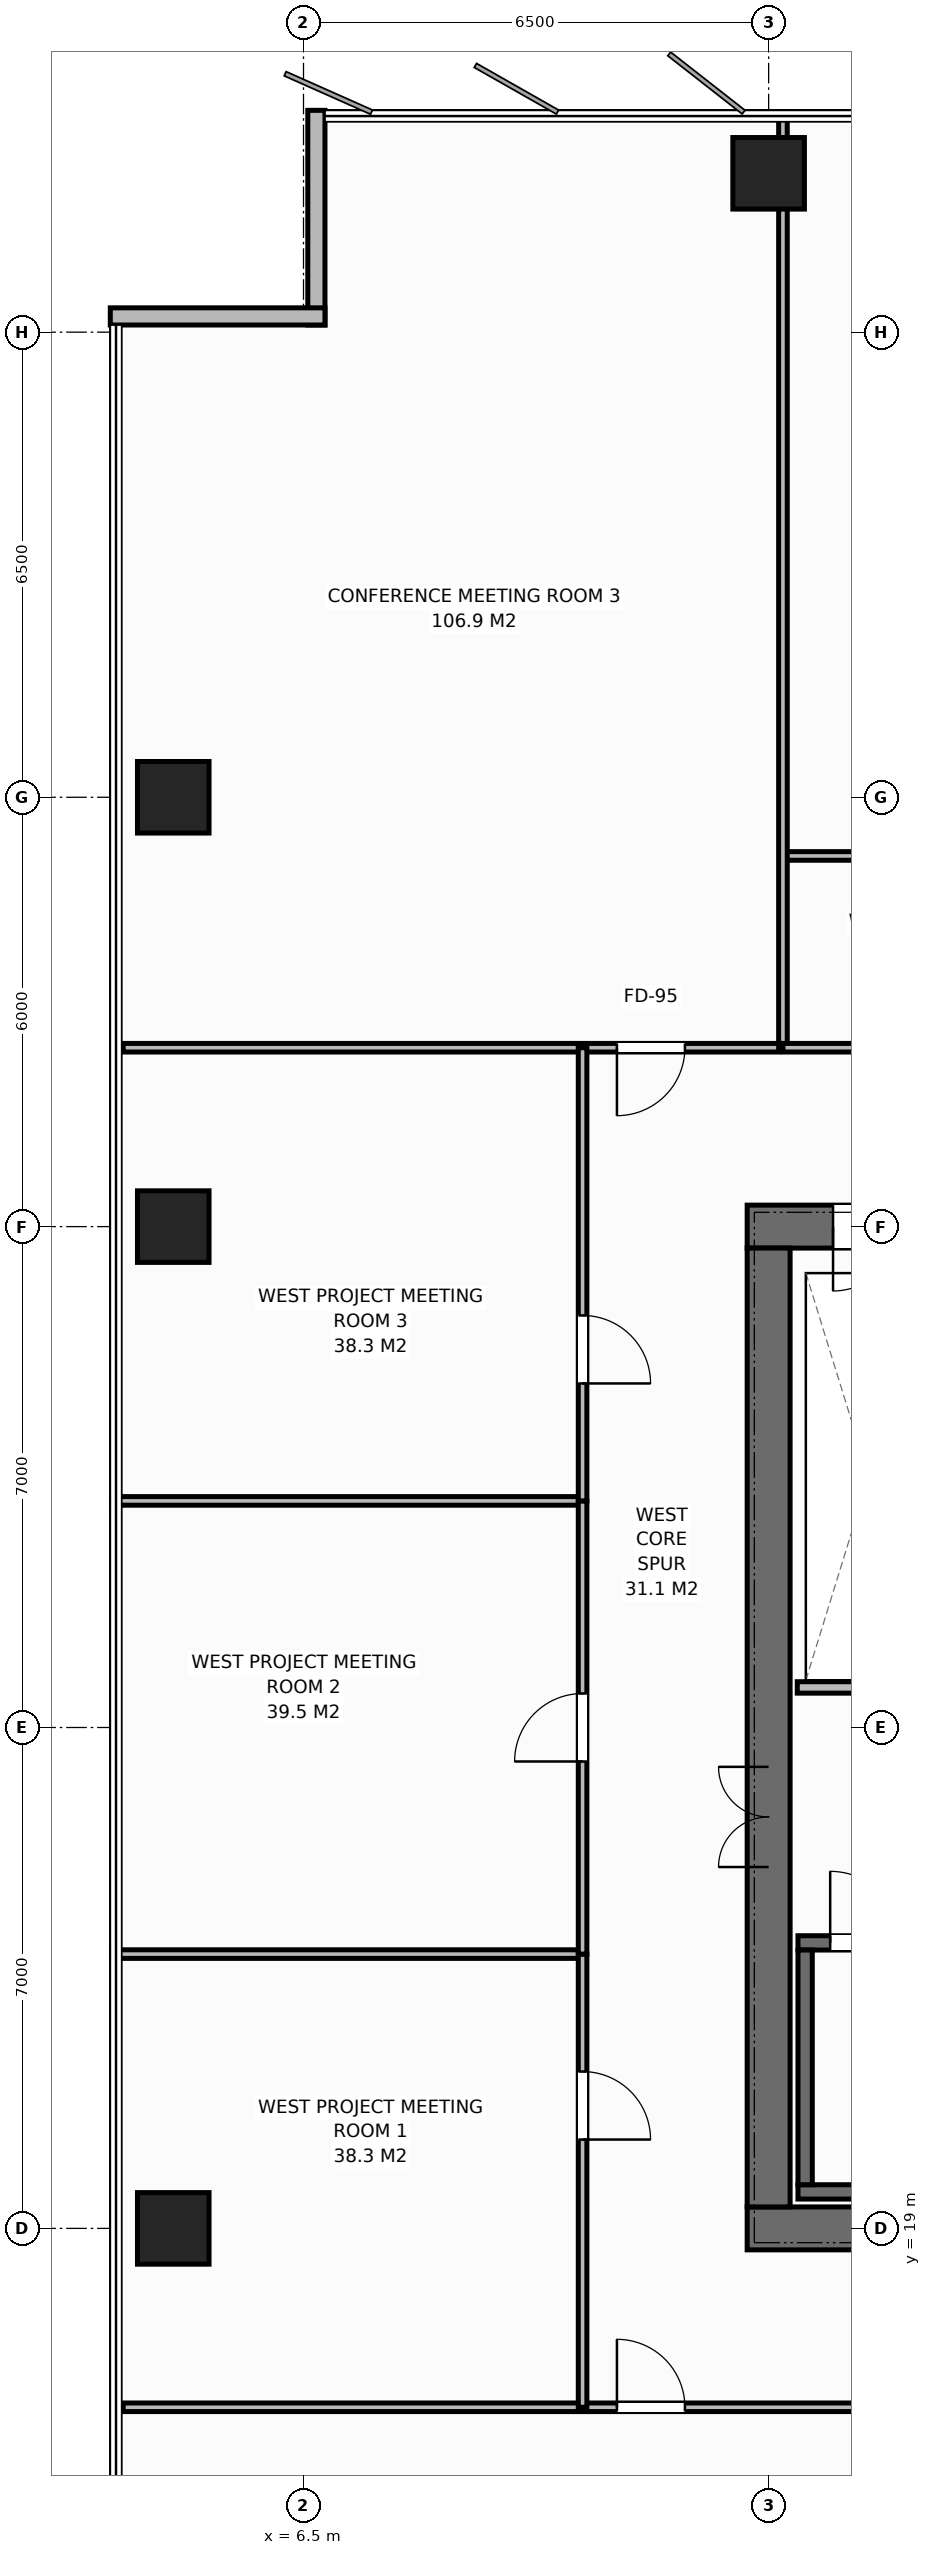
"""IFC4 building model, lengths in metres.
Left out: names, types, materials, properties, quantities, classifications, styles, units other than length and angle.
Written with IfcOpenShell. Run it as: python <this file> out.ifc"""

import sys

from ifc_helpers import new_model, si_unit, direction, frame, frame_2d, origin, origin_2d, place, context, subcontext, project, spatial, rectangle, extrude, element, fill, save


model = new_model("IFC4")
c1 = context("Model", 3, precision=1e-05, world=origin(), true_north=direction((0.0, 1.0)))
c2 = subcontext(c1, "Body", "Model", "MODEL_VIEW")
j1 = project(units=[si_unit("LENGTHUNIT", "METRE"), si_unit("PLANEANGLEUNIT", "RADIAN")], contexts=[c1])
p1 = place(None, origin())
s1 = spatial("IfcSite", under=j1, at=p1, CompositionType="ELEMENT")
p2 = place(p1, origin())
s2 = spatial("IfcBuilding", under=s1, at=p2, CompositionType="ELEMENT")
p3 = place(p2, frame((0.0, 0.0, 186.0)))
s3 = spatial("IfcBuildingStorey", under=s2, at=p3, CompositionType="ELEMENT", Elevation=186.0)
p4 = place(p3, frame((12.7, 19.0, 0.0), z_axis=(0.0, 0.0, 1.0), x_axis=(1.0, 0.0, 0.0)))
e1 = element("IfcWall", 1, at=p4, inside=s3, PredefinedType="SHEAR", context=c2, shape_type="SweptSolid", body=[
    extrude(rectangle(XDim=13.6, YDim=0.6, at=frame_2d((6.8, 0.0))), origin(), (0.0, 0.0, 1.0), 3.8),
])
p5 = place(p4, frame((9.18, 0.0, 0.0)))
e2 = element("IfcOpeningElement", 2, at=p5, cuts=e1, PredefinedType="OPENING", context=c2, shape_type="SweptSolid", body=[
    extrude(rectangle(XDim=1.4, YDim=2.2, at=frame_2d((0.7, 1.1))), frame((0.0, 0.31, 0.0), z_axis=(0.0, -1.0, 0.0), x_axis=(1.0, 0.0, 0.0)), (0.0, 0.0, 1.0), 0.62),
])
p6 = place(p3, frame((12.7, 33.0, 0.0), z_axis=(0.0, 0.0, 1.0), x_axis=(1.0, 0.0, 0.0)))
e3 = element("IfcWall", 3, at=p6, inside=s3, PredefinedType="SHEAR", context=c2, shape_type="SweptSolid", body=[
    extrude(rectangle(XDim=13.6, YDim=0.6, at=frame_2d((6.8, 0.0))), origin(), (0.0, 0.0, 1.0), 3.8),
])
p7 = place(p6, frame((1.2, 0.0, 0.0)))
e4 = element("IfcOpeningElement", 4, at=p7, cuts=e3, PredefinedType="OPENING", context=c2, shape_type="SweptSolid", body=[
    extrude(rectangle(XDim=0.9, YDim=2.15, at=frame_2d((0.45, 1.075))), frame((0.0, 0.31, 0.0), z_axis=(0.0, -1.0, 0.0), x_axis=(1.0, 0.0, 0.0)), (0.0, 0.0, 1.0), 0.62),
])
p8 = place(p6, frame((3.8, 0.0, 0.0)))
e5 = element("IfcOpeningElement", 5, at=p8, cuts=e3, PredefinedType="OPENING", context=c2, shape_type="SweptSolid", body=[
    extrude(rectangle(XDim=0.95, YDim=2.15, at=frame_2d((0.475, 1.075))), frame((0.0, 0.31, 0.0), z_axis=(0.0, -1.0, 0.0), x_axis=(1.0, 0.0, 0.0)), (0.0, 0.0, 1.0), 0.62),
])
p9 = place(p6, frame((6.8, 0.0, 0.0)))
e6 = element("IfcOpeningElement", 6, at=p9, cuts=e3, PredefinedType="OPENING", context=c2, shape_type="SweptSolid", body=[
    extrude(rectangle(XDim=0.95, YDim=2.15, at=frame_2d((0.475, 1.075))), frame((0.0, 0.31, 0.0), z_axis=(0.0, -1.0, 0.0), x_axis=(1.0, 0.0, 0.0)), (0.0, 0.0, 1.0), 0.62),
])
p10 = place(p6, frame((9.18, 0.0, 0.0)))
e7 = element("IfcOpeningElement", 7, at=p10, cuts=e3, PredefinedType="OPENING", context=c2, shape_type="SweptSolid", body=[
    extrude(rectangle(XDim=1.4, YDim=2.2, at=frame_2d((0.7, 1.1))), frame((0.0, 0.31, 0.0), z_axis=(0.0, -1.0, 0.0), x_axis=(1.0, 0.0, 0.0)), (0.0, 0.0, 1.0), 0.62),
])
p11 = place(p3, frame((13.0, 19.3, 0.0), z_axis=(0.0, 0.0, 1.0), x_axis=(0.0, 1.0, 0.0)))
e8 = element("IfcWall", 8, at=p11, inside=s3, PredefinedType="SHEAR", context=c2, shape_type="SweptSolid", body=[
    extrude(rectangle(XDim=13.4, YDim=0.6, at=frame_2d((6.7, 0.0))), origin(), (0.0, 0.0, 1.0), 3.8),
])
p12 = place(p11, frame((4.75, 0.0, 0.0)))
e9 = element("IfcOpeningElement", 9, at=p12, cuts=e8, PredefinedType="OPENING", context=c2, shape_type="SweptSolid", body=[
    extrude(rectangle(XDim=1.4, YDim=2.2, at=frame_2d((0.7, 1.1))), frame((0.0, 0.31, 0.0), z_axis=(0.0, -1.0, 0.0), x_axis=(1.0, 0.0, 0.0)), (0.0, 0.0, 1.0), 0.62),
])
p13 = place(p3, frame((13.41, 19.51, 0.0), z_axis=(0.0, 0.0, 1.0), x_axis=(1.0, 0.0, 0.0)))
e10 = element("IfcWall", 10, at=p13, inside=s3, PredefinedType="SHEAR", context=c2, shape_type="SweptSolid", body=[
    extrude(rectangle(XDim=8.43, YDim=0.2, at=frame_2d((4.215, 0.0))), origin(), (0.0, 0.0, 1.0), 3.8),
])
p14 = place(p3, frame((13.41, 22.99, 0.0), z_axis=(0.0, 0.0, 1.0), x_axis=(1.0, 0.0, 0.0)))
e11 = element("IfcWall", 11, at=p14, inside=s3, PredefinedType="SHEAR", context=c2, shape_type="SweptSolid", body=[
    extrude(rectangle(XDim=8.43, YDim=0.2, at=frame_2d((4.215, 0.0))), origin(), (0.0, 0.0, 1.0), 3.8),
])
p15 = place(p14, frame((0.45, 0.0, 0.0)))
e12 = element("IfcOpeningElement", 12, at=p15, cuts=e11, PredefinedType="OPENING", context=c2, shape_type="SweptSolid", body=[
    extrude(rectangle(XDim=1.0, YDim=2.15, at=frame_2d((0.5, 1.075))), frame((0.0, 0.11, 0.0), z_axis=(0.0, -1.0, 0.0), x_axis=(1.0, 0.0, 0.0)), (0.0, 0.0, 1.0), 0.22),
])
p16 = place(p3, frame((13.51, 19.61, 0.0), z_axis=(0.0, 0.0, 1.0), x_axis=(0.0, 1.0, 0.0)))
e13 = element("IfcWall", 13, at=p16, inside=s3, PredefinedType="SHEAR", context=c2, shape_type="SweptSolid", body=[
    extrude(rectangle(XDim=3.28, YDim=0.2, at=frame_2d((1.64, 0.0))), origin(), (0.0, 0.0, 1.0), 3.8),
])
for number, where, z_axis, x_axis in (
    (14, (13.0, 47.72, 0.0), (0.0, 0.0, 1.0), (1.0, 0.0, 0.0)),
    (15, (4.68, 19.0, 0.0), (0.0, 0.0, 1.0), (1.0, 0.0, 0.0)),
    (16, (4.68, 33.0, 0.0), (0.0, 0.0, 1.0), (1.0, 0.0, 0.0)),
    (17, (4.68, 39.0, 0.0), (0.0, 0.0, 1.0), (1.0, 0.0, 0.0)),
):
    element("IfcColumn", number, at=place(p3, frame(where, z_axis=z_axis, x_axis=x_axis)), inside=s3, PredefinedType="COLUMN", context=c2, shape_type="SweptSolid", body=[
        extrude(rectangle(XDim=1.0, YDim=1.0, at=origin_2d()), origin(), (0.0, 0.0, 1.0), 3.8),
    ])
for number, where, z_axis, x_axis in (
    (18, (6.68, 45.6, 0.0), (0.0, 0.0, 1.0), (0.0, 1.0, 0.0)),
    (19, (3.8, 45.72, 0.0), (0.0, 0.0, 1.0), (1.0, 0.0, 0.0)),
):
    element("IfcWall", number, at=place(p3, frame(where, z_axis=z_axis, x_axis=x_axis)), inside=s3, PredefinedType="STANDARD", context=c2, shape_type="SweptSolid", body=[
        extrude(rectangle(XDim=3.0, YDim=0.24, at=frame_2d((1.5, 0.0))), origin(), (0.0, 0.0, 1.0), 3.572),
    ])
p17 = place(p3, frame((13.4, 26.56, 0.0), z_axis=(0.0, 0.0, 1.0), x_axis=(1.0, 0.0, 0.0)))
e20 = element("IfcWall", 20, at=p17, inside=s3, PredefinedType="STANDARD", context=c2, shape_type="SweptSolid", body=[
    extrude(rectangle(XDim=8.34, YDim=0.16, at=frame_2d((4.17, 0.0))), origin(), (0.0, 0.0, 1.0), 3.572),
])
p18 = place(p3, frame((13.2, 35.5, 0.0), z_axis=(0.0, 0.0, 1.0), x_axis=(1.0, 0.0, 0.0)))
e21 = element("IfcWall", 21, at=p18, inside=s3, PredefinedType="PARTITIONING", context=c2, shape_type="SweptSolid", body=[
    extrude(rectangle(XDim=13.16, YDim=0.12, at=frame_2d((6.58, 0.0))), origin(), (0.0, 0.0, 1.0), 3.572),
])
p19 = place(p18, frame((1.35, 0.0, 0.0)))
e22 = element("IfcOpeningElement", 22, at=p19, cuts=e21, PredefinedType="OPENING", context=c2, shape_type="SweptSolid", body=[
    extrude(rectangle(XDim=0.9, YDim=2.15, at=frame_2d((0.45, 1.075))), frame((0.0, 0.07, 0.0), z_axis=(0.0, -1.0, 0.0), x_axis=(1.0, 0.0, 0.0)), (0.0, 0.0, 1.0), 0.14),
])
p20 = place(p18, frame((4.05, 0.0, 0.0)))
e23 = element("IfcOpeningElement", 23, at=p20, cuts=e21, PredefinedType="OPENING", context=c2, shape_type="SweptSolid", body=[
    extrude(rectangle(XDim=0.9, YDim=2.15, at=frame_2d((0.45, 1.075))), frame((0.0, 0.07, 0.0), z_axis=(0.0, -1.0, 0.0), x_axis=(1.0, 0.0, 0.0)), (0.0, 0.0, 1.0), 0.14),
])
p21 = place(p18, frame((8.25, 0.0, 0.0)))
e24 = element("IfcOpeningElement", 24, at=p21, cuts=e21, PredefinedType="OPENING", context=c2, shape_type="SweptSolid", body=[
    extrude(rectangle(XDim=0.9, YDim=2.15, at=frame_2d((0.45, 1.075))), frame((0.0, 0.07, 0.0), z_axis=(0.0, -1.0, 0.0), x_axis=(1.0, 0.0, 0.0)), (0.0, 0.0, 1.0), 0.14),
])
p22 = place(p18, frame((11.0, 0.0, 0.0)))
e25 = element("IfcOpeningElement", 25, at=p22, cuts=e21, PredefinedType="OPENING", context=c2, shape_type="SweptSolid", body=[
    extrude(rectangle(XDim=0.95, YDim=2.15, at=frame_2d((0.475, 1.075))), frame((0.0, 0.07, 0.0), z_axis=(0.0, -1.0, 0.0), x_axis=(1.0, 0.0, 0.0)), (0.0, 0.0, 1.0), 0.14),
])
p23 = place(p3, frame((13.2, 38.18, 0.0), z_axis=(0.0, 0.0, 1.0), x_axis=(1.0, 0.0, 0.0)))
e26 = element("IfcWall", 26, at=p23, inside=s3, PredefinedType="PARTITIONING", context=c2, shape_type="SweptSolid", body=[
    extrude(rectangle(XDim=13.16, YDim=0.12, at=frame_2d((6.58, 0.0))), origin(), (0.0, 0.0, 1.0), 3.572),
])
p24 = place(p3, frame((13.2, 35.56, 0.0), z_axis=(0.0, 0.0, 1.0), x_axis=(0.0, 1.0, 0.0)))
e27 = element("IfcWall", 27, at=p24, inside=s3, PredefinedType="PARTITIONING", context=c2, shape_type="SweptSolid", body=[
    extrude(rectangle(XDim=13.02, YDim=0.12, at=frame_2d((6.51, 0.0))), origin(), (0.0, 0.0, 1.0), 3.022),
])
p25 = place(p3, frame((3.98, 35.5, 0.0), z_axis=(0.0, 0.0, 1.0), x_axis=(1.0, 0.0, 0.0)))
e28 = element("IfcWall", 28, at=p25, inside=s3, PredefinedType="PARTITIONING", context=c2, shape_type="SweptSolid", body=[
    extrude(rectangle(XDim=9.16, YDim=0.12, at=frame_2d((4.58, 0.0))), origin(), (0.0, 0.0, 1.0), 3.572),
])
p26 = place(p25, frame((6.9, 0.0, 0.0)))
e29 = element("IfcOpeningElement", 29, at=p26, cuts=e28, PredefinedType="OPENING", context=c2, shape_type="SweptSolid", body=[
    extrude(rectangle(XDim=0.95, YDim=2.15, at=frame_2d((0.475, 1.075))), frame((0.0, 0.07, 0.0), z_axis=(0.0, -1.0, 0.0), x_axis=(1.0, 0.0, 0.0)), (0.0, 0.0, 1.0), 0.14),
])
p27 = place(p3, frame((3.98, 16.5, 0.0), z_axis=(0.0, 0.0, 1.0), x_axis=(1.0, 0.0, 0.0)))
e30 = element("IfcWall", 30, at=p27, inside=s3, PredefinedType="PARTITIONING", context=c2, shape_type="SweptSolid", body=[
    extrude(rectangle(XDim=10.537, YDim=0.12, at=frame_2d((5.269, 0.0))), origin(), (0.0, 0.0, 1.0), 3.572),
])
p28 = place(p27, frame((6.9, 0.0, 0.0)))
e31 = element("IfcOpeningElement", 31, at=p28, cuts=e30, PredefinedType="OPENING", context=c2, shape_type="SweptSolid", body=[
    extrude(rectangle(XDim=0.95, YDim=2.15, at=frame_2d((0.475, 1.075))), frame((0.0, 0.07, 0.0), z_axis=(0.0, -1.0, 0.0), x_axis=(1.0, 0.0, 0.0)), (0.0, 0.0, 1.0), 0.14),
])
p29 = place(p3, frame((3.82, 22.833, 0.0), z_axis=(0.0, 0.0, 1.0), x_axis=(1.0, 0.0, 0.0)))
e32 = element("IfcWall", 32, at=p29, inside=s3, PredefinedType="PARTITIONING", context=c2, shape_type="SweptSolid", body=[
    extrude(rectangle(XDim=6.58, YDim=0.12, at=frame_2d((3.29, 0.0))), origin(), (0.0, 0.0, 1.0), 3.572),
])
p30 = place(p3, frame((10.4, 16.5, 0.0), z_axis=(0.0, 0.0, 1.0), x_axis=(0.0, 1.0, 0.0)))
e33 = element("IfcWall", 33, at=p30, inside=s3, PredefinedType="PARTITIONING", context=c2, shape_type="SweptSolid", body=[
    extrude(rectangle(XDim=6.333, YDim=0.12, at=frame_2d((3.167, 0.0))), origin(), (0.0, 0.0, 1.0), 3.572),
])
p31 = place(p30, frame((3.742, 0.0, 0.0)))
e34 = element("IfcOpeningElement", 34, at=p31, cuts=e33, PredefinedType="OPENING", context=c2, shape_type="SweptSolid", body=[
    extrude(rectangle(XDim=0.95, YDim=2.15, at=frame_2d((0.475, 1.075))), frame((0.0, 0.07, 0.0), z_axis=(0.0, -1.0, 0.0), x_axis=(1.0, 0.0, 0.0)), (0.0, 0.0, 1.0), 0.14),
])
p32 = place(p3, frame((3.82, 29.167, 0.0), z_axis=(0.0, 0.0, 1.0), x_axis=(1.0, 0.0, 0.0)))
e35 = element("IfcWall", 35, at=p32, inside=s3, PredefinedType="PARTITIONING", context=c2, shape_type="SweptSolid", body=[
    extrude(rectangle(XDim=6.58, YDim=0.12, at=frame_2d((3.29, 0.0))), origin(), (0.0, 0.0, 1.0), 3.572),
])
p33 = place(p3, frame((10.4, 22.833, 0.0), z_axis=(0.0, 0.0, 1.0), x_axis=(0.0, 1.0, 0.0)))
e36 = element("IfcWall", 36, at=p33, inside=s3, PredefinedType="PARTITIONING", context=c2, shape_type="SweptSolid", body=[
    extrude(rectangle(XDim=6.333, YDim=0.12, at=frame_2d((3.167, 0.0))), origin(), (0.0, 0.0, 1.0), 3.572),
])
p34 = place(p33, frame((2.692, 0.0, 0.0)))
e37 = element("IfcOpeningElement", 37, at=p34, cuts=e36, PredefinedType="OPENING", context=c2, shape_type="SweptSolid", body=[
    extrude(rectangle(XDim=0.95, YDim=2.15, at=frame_2d((0.475, 1.075))), frame((0.0, 0.07, 0.0), z_axis=(0.0, -1.0, 0.0), x_axis=(1.0, 0.0, 0.0)), (0.0, 0.0, 1.0), 0.14),
])
p35 = place(p3, frame((10.4, 29.167, 0.0), z_axis=(0.0, 0.0, 1.0), x_axis=(0.0, 1.0, 0.0)))
e38 = element("IfcWall", 38, at=p35, inside=s3, PredefinedType="PARTITIONING", context=c2, shape_type="SweptSolid", body=[
    extrude(rectangle(XDim=6.333, YDim=0.12, at=frame_2d((3.167, 0.0))), origin(), (0.0, 0.0, 1.0), 3.572),
])
p36 = place(p35, frame((1.642, 0.0, 0.0)))
e39 = element("IfcOpeningElement", 39, at=p36, cuts=e38, PredefinedType="OPENING", context=c2, shape_type="SweptSolid", body=[
    extrude(rectangle(XDim=0.95, YDim=2.15, at=frame_2d((0.475, 1.075))), frame((0.0, 0.07, 0.0), z_axis=(0.0, -1.0, 0.0), x_axis=(1.0, 0.0, 0.0)), (0.0, 0.0, 1.0), 0.14),
])
p37 = place(p15, origin())
e40 = element("IfcDoor", 40, at=p37, inside=s3, OperationType="SINGLE_SWING_LEFT", PredefinedType="DOOR", context=c2, shape_type="SweptSolid", body=[
    extrude(rectangle(XDim=1.0, YDim=2.15, at=frame_2d((0.5, 1.075))), frame((0.0, 0.025, 0.0), z_axis=(0.0, -1.0, 0.0), x_axis=(1.0, 0.0, 0.0)), (0.0, 0.0, 1.0), 0.05),
])
fill(e12, e40)
p38 = place(p12, origin())
e41 = element("IfcDoor", 41, at=p38, inside=s3, OperationType="DOUBLE_DOOR_SINGLE_SWING", PredefinedType="DOOR", context=c2, shape_type="SweptSolid", body=[
    extrude(rectangle(XDim=1.4, YDim=2.2, at=frame_2d((0.7, 1.1))), frame((0.0, 0.025, 0.0), z_axis=(0.0, -1.0, 0.0), x_axis=(1.0, 0.0, 0.0)), (0.0, 0.0, 1.0), 0.05),
])
fill(e9, e41)
p39 = place(p7, origin())
e42 = element("IfcDoor", 42, at=p39, inside=s3, OperationType="SINGLE_SWING_RIGHT", PredefinedType="DOOR", context=c2, shape_type="SweptSolid", body=[
    extrude(rectangle(XDim=0.9, YDim=2.15, at=frame_2d((0.45, 1.075))), frame((0.0, -0.025, 0.0), z_axis=(0.0, -1.0, 0.0), x_axis=(1.0, 0.0, 0.0)), (0.0, 0.0, 1.0), 0.05),
])
fill(e4, e42)
p40 = place(p26, origin())
e43 = element("IfcDoor", 43, at=p40, inside=s3, OperationType="SINGLE_SWING_RIGHT", PredefinedType="DOOR", context=c2, shape_type="SweptSolid", body=[
    extrude(rectangle(XDim=0.95, YDim=2.15, at=frame_2d((0.475, 1.075))), frame((0.0, 0.025, 0.0), z_axis=(0.0, -1.0, 0.0), x_axis=(1.0, 0.0, 0.0)), (0.0, 0.0, 1.0), 0.05),
])
fill(e29, e43)
p41 = place(p28, origin())
e44 = element("IfcDoor", 44, at=p41, inside=s3, OperationType="SINGLE_SWING_LEFT", PredefinedType="DOOR", context=c2, shape_type="SweptSolid", body=[
    extrude(rectangle(XDim=0.95, YDim=2.15, at=frame_2d((0.475, 1.075))), frame((0.0, 0.025, 0.0), z_axis=(0.0, -1.0, 0.0), x_axis=(1.0, 0.0, 0.0)), (0.0, 0.0, 1.0), 0.05),
])
fill(e31, e44)
p42 = place(p31, origin())
e45 = element("IfcDoor", 45, at=p42, inside=s3, OperationType="SINGLE_SWING_RIGHT", PredefinedType="DOOR", context=c2, shape_type="SweptSolid", body=[
    extrude(rectangle(XDim=0.95, YDim=2.15, at=frame_2d((0.475, 1.075))), frame((0.0, 0.025, 0.0), z_axis=(0.0, -1.0, 0.0), x_axis=(1.0, 0.0, 0.0)), (0.0, 0.0, 1.0), 0.05),
])
fill(e34, e45)
p43 = place(p34, origin())
e46 = element("IfcDoor", 46, at=p43, inside=s3, OperationType="SINGLE_SWING_LEFT", PredefinedType="DOOR", context=c2, shape_type="SweptSolid", body=[
    extrude(rectangle(XDim=0.95, YDim=2.15, at=frame_2d((0.475, 1.075))), frame((0.0, 0.025, 0.0), z_axis=(0.0, -1.0, 0.0), x_axis=(1.0, 0.0, 0.0)), (0.0, 0.0, 1.0), 0.05),
])
fill(e37, e46)
p44 = place(p36, origin())
e47 = element("IfcDoor", 47, at=p44, inside=s3, OperationType="SINGLE_SWING_RIGHT", PredefinedType="DOOR", context=c2, shape_type="SweptSolid", body=[
    extrude(rectangle(XDim=0.95, YDim=2.15, at=frame_2d((0.475, 1.075))), frame((0.0, 0.025, 0.0), z_axis=(0.0, -1.0, 0.0), x_axis=(1.0, 0.0, 0.0)), (0.0, 0.0, 1.0), 0.05),
])
fill(e39, e47)
save(model, sys.argv[1])
